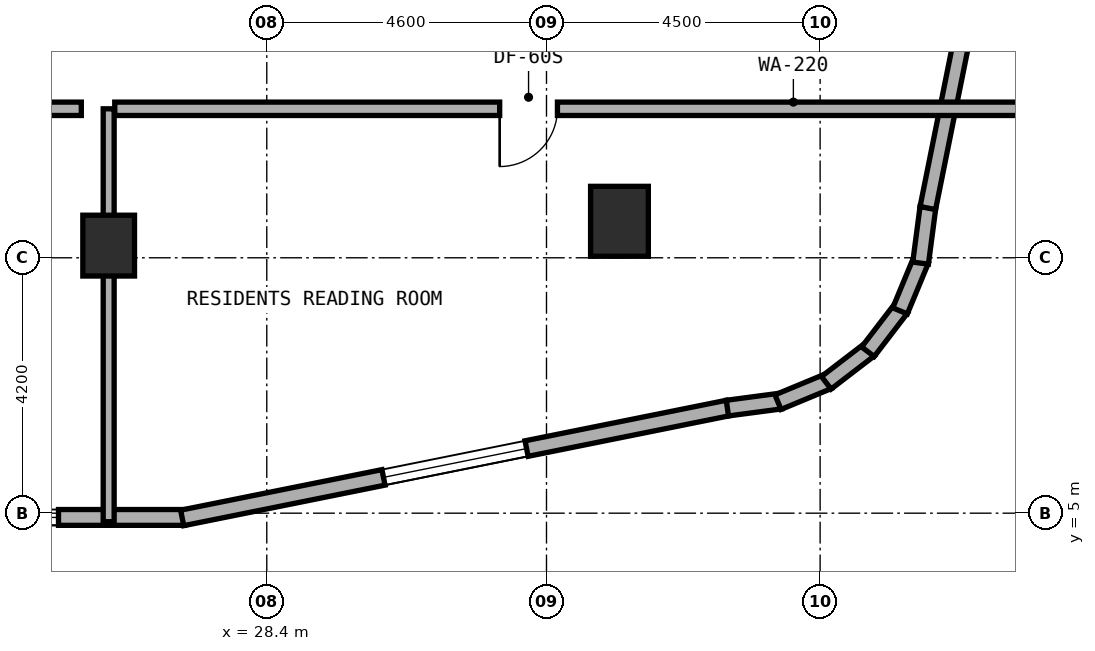
"""IFC4 building model, lengths in metres.
Left out: names, types, materials, properties, quantities, classifications, styles, units other than length and angle.
Written with IfcOpenShell. Run it as: python <this file> out.ifc"""

import sys

from ifc_helpers import new_model, si_unit, direction, frame, frame_2d, origin, origin_2d, place, context, subcontext, project, spatial, rectangle, extrude, element, fill, save


model = new_model("IFC4")
c1 = context("Model", 3, precision=1e-05, world=origin(), true_north=direction((0.0, 1.0)))
c2 = subcontext(c1, "Body", "Model", "MODEL_VIEW")
j1 = project(units=[si_unit("LENGTHUNIT", "METRE"), si_unit("PLANEANGLEUNIT", "RADIAN")], contexts=[c1])
p1 = place(None, origin())
s1 = spatial("IfcSite", under=j1, at=p1, CompositionType="ELEMENT")
p2 = place(p1, origin())
s2 = spatial("IfcBuilding", under=s1, at=p2, CompositionType="ELEMENT")
p3 = place(p2, frame((0.0, 0.0, 112.5)))
s3 = spatial("IfcBuildingStorey", under=s2, at=p3, CompositionType="ELEMENT", Elevation=112.5)
p4 = place(p3, frame((25.8, 9.4, 0.0), z_axis=(0.0, 0.0, 1.0), x_axis=(1.0, 0.0, 0.0)))
e1 = element("IfcColumn", 1, at=p4, inside=s3, PredefinedType="COLUMN", context=c2, shape_type="SweptSolid", body=[
    extrude(rectangle(XDim=0.85, YDim=1.0, at=origin_2d()), origin(), (0.0, 0.0, 1.0), 3.5),
])
p5 = place(p3, frame((34.2, 9.8, 0.0), z_axis=(0.0, 0.0, 1.0), x_axis=(1.0, 0.0, 0.0)))
e2 = element("IfcColumn", 2, at=p5, inside=s3, PredefinedType="COLUMN", context=c2, shape_type="SweptSolid", body=[
    extrude(rectangle(XDim=0.95, YDim=1.15, at=origin_2d()), origin(), (0.0, 0.0, 1.0), 3.5),
])
p6 = place(p3, frame((14.915, 4.93, 0.0), z_axis=(0.0, 0.0, 1.0), x_axis=(1.0, 0.0, 0.0)))
e3 = element("IfcWall", 3, at=p6, inside=s3, PredefinedType="STANDARD", context=c2, shape_type="SweptSolid", body=[
    extrude(rectangle(XDim=12.135, YDim=0.26, at=frame_2d((6.067, 0.0))), origin(), (0.0, 0.0, 1.0), 3.22),
])
p7 = place(p6, frame((5.485, 0.0, 0.0)))
e4 = element("IfcOpeningElement", 4, at=p7, cuts=e3, PredefinedType="OPENING", context=c2, shape_type="SweptSolid", body=[
    extrude(rectangle(XDim=1.2, YDim=2.15, at=frame_2d((0.6, 1.075))), frame((0.0, 0.14, 0.0), z_axis=(0.0, -1.0, 0.0), x_axis=(1.0, 0.0, 0.0)), (0.0, 0.0, 1.0), 0.28),
])
p8 = place(p6, frame((1.438, 0.0, 0.8)))
e5 = element("IfcOpeningElement", 5, at=p8, cuts=e3, PredefinedType="OPENING", context=c2, shape_type="SweptSolid", body=[
    extrude(rectangle(XDim=2.4, YDim=1.6, at=frame_2d((1.2, 0.8))), frame((0.0, 0.14, 0.0), z_axis=(0.0, -1.0, 0.0), x_axis=(1.0, 0.0, 0.0)), (0.0, 0.0, 1.0), 0.28),
])
p9 = place(p6, frame((7.66, 0.0, 0.8)))
e6 = element("IfcOpeningElement", 6, at=p9, cuts=e3, PredefinedType="OPENING", context=c2, shape_type="SweptSolid", body=[
    extrude(rectangle(XDim=2.4, YDim=1.6, at=frame_2d((1.2, 0.8))), frame((0.0, 0.14, 0.0), z_axis=(0.0, -1.0, 0.0), x_axis=(1.0, 0.0, 0.0)), (0.0, 0.0, 1.0), 0.28),
])
p10 = place(p3, frame((27.009, 4.922, 0.0), z_axis=(0.0, 0.0, 1.0), x_axis=(0.980321298532, 0.197408590603, 0.0)))
e7 = element("IfcWall", 7, at=p10, inside=s3, PredefinedType="STANDARD", context=c2, shape_type="SweptSolid", body=[
    extrude(rectangle(XDim=9.153, YDim=0.26, at=frame_2d((4.577, 0.0))), origin(), (0.0, 0.0, 1.0), 3.22),
])
p11 = place(p10, frame((3.377, 0.0, 0.8)))
e8 = element("IfcOpeningElement", 8, at=p11, cuts=e7, PredefinedType="OPENING", context=c2, shape_type="SweptSolid", body=[
    extrude(rectangle(XDim=2.4, YDim=1.6, at=frame_2d((1.2, 0.8))), frame((0.0, 0.14, 0.0), z_axis=(0.0, -1.0, 0.0), x_axis=(1.0, 0.0, 0.0)), (0.0, 0.0, 1.0), 0.28),
])
p12 = place(p3, frame((35.975, 6.728, 0.0), z_axis=(0.0, 0.0, 1.0), x_axis=(0.991388484223, 0.130953706898, 0.0)))
e9 = element("IfcWall", 9, at=p12, inside=s3, PredefinedType="STANDARD", context=c2, shape_type="SweptSolid", body=[
    extrude(rectangle(XDim=0.885, YDim=0.26, at=frame_2d((0.443, 0.0))), origin(), (0.0, 0.0, 1.0), 3.22),
])
p13 = place(p3, frame((36.807, 6.826, 0.0), z_axis=(0.0, 0.0, 1.0), x_axis=(0.923627776508, 0.383290660547, 0.0)))
e10 = element("IfcWall", 10, at=p13, inside=s3, PredefinedType="STANDARD", context=c2, shape_type="SweptSolid", body=[
    extrude(rectangle(XDim=0.903, YDim=0.26, at=frame_2d((0.452, 0.0))), origin(), (0.0, 0.0, 1.0), 3.22),
])
p14 = place(p3, frame((37.601, 7.144, 0.0), z_axis=(0.0, 0.0, 1.0), x_axis=(0.793458244748, 0.608624690463, 0.0)))
e11 = element("IfcWall", 11, at=p14, inside=s3, PredefinedType="STANDARD", context=c2, shape_type="SweptSolid", body=[
    extrude(rectangle(XDim=0.902, YDim=0.26, at=frame_2d((0.451, 0.0))), origin(), (0.0, 0.0, 1.0), 3.22),
])
p15 = place(p3, frame((38.286, 7.655, 0.0), z_axis=(0.0, 0.0, 1.0), x_axis=(0.608494022858, 0.793558456666, 0.0)))
e12 = element("IfcWall", 12, at=p15, inside=s3, PredefinedType="STANDARD", context=c2, shape_type="SweptSolid", body=[
    extrude(rectangle(XDim=0.902, YDim=0.26, at=frame_2d((0.451, 0.0))), origin(), (0.0, 0.0, 1.0), 3.22),
])
p16 = place(p3, frame((38.814, 8.327, 0.0), z_axis=(0.0, 0.0, 1.0), x_axis=(0.383155708213, 0.923683767999, 0.0)))
e13 = element("IfcWall", 13, at=p16, inside=s3, PredefinedType="STANDARD", context=c2, shape_type="SweptSolid", body=[
    extrude(rectangle(XDim=0.903, YDim=0.26, at=frame_2d((0.451, 0.0))), origin(), (0.0, 0.0, 1.0), 3.22),
])
p17 = place(p3, frame((39.152, 9.112, 0.0), z_axis=(0.0, 0.0, 1.0), x_axis=(0.130200706103, 0.991487658083, 0.0)))
e14 = element("IfcWall", 14, at=p17, inside=s3, PredefinedType="STANDARD", context=c2, shape_type="SweptSolid", body=[
    extrude(rectangle(XDim=0.921, YDim=0.26, at=frame_2d((0.46, 0.0))), origin(), (0.0, 0.0, 1.0), 3.22),
])
p18 = place(p3, frame((39.271, 10.018, 0.0), z_axis=(0.0, 0.0, 1.0), x_axis=(0.197435082048, 0.980315963543, 0.0)))
e15 = element("IfcWall", 15, at=p18, inside=s3, PredefinedType="STANDARD", context=c2, shape_type="SweptSolid", body=[
    extrude(rectangle(XDim=9.183, YDim=0.26, at=frame_2d((4.591, 0.0))), origin(), (0.0, 0.0, 1.0), 3.22),
])
p19 = place(p18, frame((4.286, 0.0, 0.8)))
e16 = element("IfcOpeningElement", 16, at=p19, cuts=e15, PredefinedType="OPENING", context=c2, shape_type="SweptSolid", body=[
    extrude(rectangle(XDim=2.4, YDim=1.6, at=frame_2d((1.2, 0.8))), frame((0.0, 0.14, 0.0), z_axis=(0.0, -1.0, 0.0), x_axis=(1.0, 0.0, 0.0)), (0.0, 0.0, 1.0), 0.28),
])
p20 = place(p3, frame((12.05, 11.65, 0.0), z_axis=(0.0, 0.0, 1.0), x_axis=(1.0, 0.0, 0.0)))
e17 = element("IfcWall", 17, at=p20, inside=s3, PredefinedType="SOLIDWALL", context=c2, shape_type="SweptSolid", body=[
    extrude(rectangle(XDim=13.3, YDim=0.22, at=frame_2d((6.65, 0.0))), origin(), (0.0, 0.0, 1.0), 2.695),
])
p21 = place(p20, frame((5.48, 0.0, 0.0)))
e18 = element("IfcOpeningElement", 18, at=p21, cuts=e17, PredefinedType="OPENING", context=c2, shape_type="SweptSolid", body=[
    extrude(rectangle(XDim=1.1, YDim=2.1, at=frame_2d((0.55, 1.05))), frame((0.0, 0.12, 0.0), z_axis=(0.0, -1.0, 0.0), x_axis=(1.0, 0.0, 0.0)), (0.0, 0.0, 1.0), 0.24),
])
p22 = place(p3, frame((25.8, 4.86, 0.0), z_axis=(0.0, 0.0, 1.0), x_axis=(0.0, 1.0, 0.0)))
e19 = element("IfcWall", 19, at=p22, inside=s3, PredefinedType="SOLIDWALL", context=c2, shape_type="SweptSolid", body=[
    extrude(rectangle(XDim=6.79, YDim=0.18, at=frame_2d((3.395, 0.0))), origin(), (0.0, 0.0, 1.0), 2.695),
])
p23 = place(p3, frame((25.9, 11.65, 0.0), z_axis=(0.0, 0.0, 1.0), x_axis=(1.0, 0.0, 0.0)))
e20 = element("IfcWall", 20, at=p23, inside=s3, PredefinedType="SOLIDWALL", context=c2, shape_type="SweptSolid", body=[
    extrude(rectangle(XDim=15.04, YDim=0.22, at=frame_2d((7.52, 0.0))), origin(), (0.0, 0.0, 1.0), 2.695),
])
p24 = place(p23, frame((6.33, 0.0, 0.0)))
e21 = element("IfcOpeningElement", 21, at=p24, cuts=e20, PredefinedType="OPENING", context=c2, shape_type="SweptSolid", body=[
    extrude(rectangle(XDim=0.95, YDim=2.1, at=frame_2d((0.475, 1.05))), frame((0.0, 0.12, 0.0), z_axis=(0.0, -1.0, 0.0), x_axis=(1.0, 0.0, 0.0)), (0.0, 0.0, 1.0), 0.24),
])
p25 = place(p9, origin())
e22 = element("IfcWindow", 22, at=p25, inside=s3, PartitioningType="SINGLE_PANEL", PredefinedType="WINDOW", context=c2, shape_type="SweptSolid", body=[
    extrude(rectangle(XDim=2.4, YDim=1.6, at=frame_2d((1.2, 0.8))), frame((0.0, 0.03, 0.0), z_axis=(0.0, -1.0, 0.0), x_axis=(1.0, 0.0, 0.0)), (0.0, 0.0, 1.0), 0.06),
])
fill(e6, e22)
p26 = place(p11, origin())
e23 = element("IfcWindow", 23, at=p26, inside=s3, PartitioningType="SINGLE_PANEL", PredefinedType="WINDOW", context=c2, shape_type="SweptSolid", body=[
    extrude(rectangle(XDim=2.4, YDim=1.6, at=frame_2d((1.2, 0.8))), frame((0.0, 0.03, 0.0), z_axis=(0.0, -1.0, 0.0), x_axis=(1.0, 0.0, 0.0)), (0.0, 0.0, 1.0), 0.06),
])
fill(e8, e23)
p27 = place(p24, frame((0.95, 0.0, 0.0), z_axis=(0.0, 0.0, 1.0), x_axis=(-1.0, 0.0, 0.0)))
e24 = element("IfcDoor", 24, at=p27, inside=s3, OperationType="SINGLE_SWING_RIGHT", PredefinedType="DOOR", context=c2, shape_type="SweptSolid", body=[
    extrude(rectangle(XDim=0.95, YDim=2.1, at=frame_2d((0.475, 1.05))), frame((0.0, 0.025, 0.0), z_axis=(0.0, -1.0, 0.0), x_axis=(1.0, 0.0, 0.0)), (0.0, 0.0, 1.0), 0.05),
])
fill(e21, e24)
save(model, sys.argv[1])
